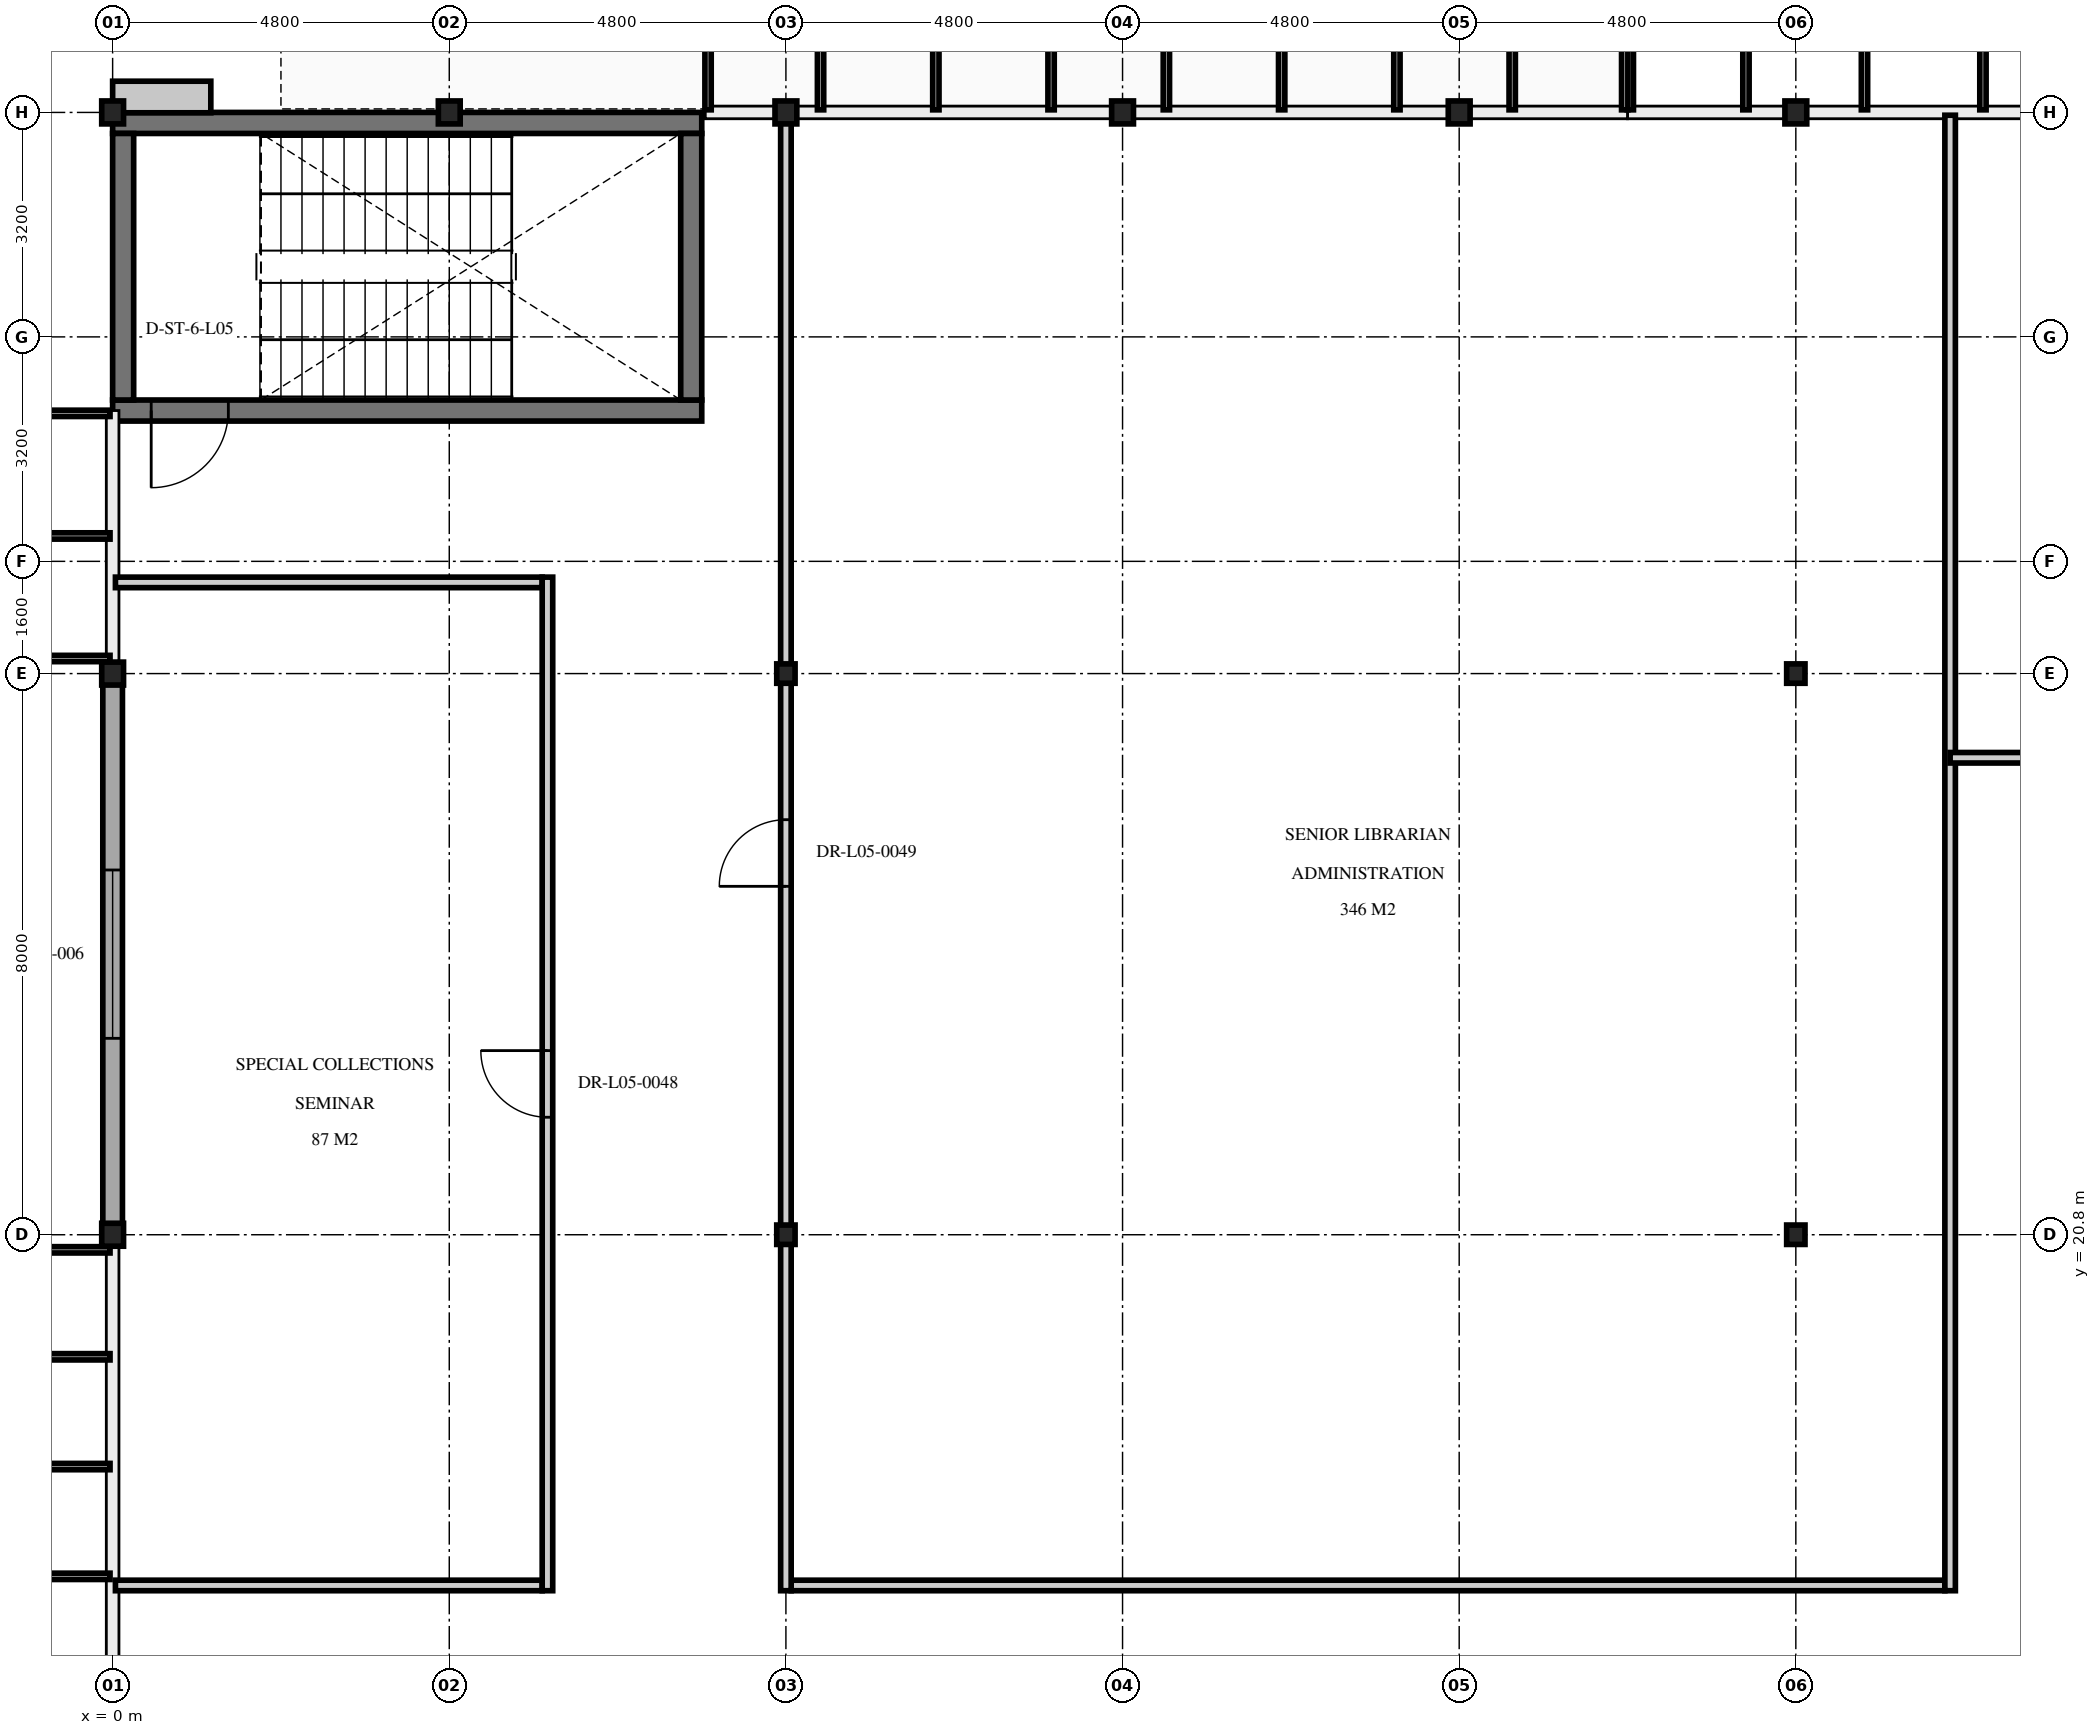
"""IFC4 building model, lengths in metres.
Left out: names, types, materials, properties, quantities, classifications, styles, units other than length and angle.
Written with IfcOpenShell. Run it as: python <this file> out.ifc"""

import sys

from ifc_helpers import new_model, si_unit, direction, frame, frame_2d, origin, origin_2d, place, context, subcontext, project, spatial, rectangle, i_section, extrude, element, fill, save


model = new_model("IFC4")
c1 = context("Model", 3, precision=1e-05, world=origin(), true_north=direction((0.0, 1.0)))
c2 = subcontext(c1, "Body", "Model", "MODEL_VIEW")
j1 = project(units=[si_unit("LENGTHUNIT", "METRE"), si_unit("PLANEANGLEUNIT", "RADIAN")], contexts=[c1])
p1 = place(None, origin())
s1 = spatial("IfcSite", under=j1, at=p1, CompositionType="ELEMENT")
p2 = place(p1, origin())
s2 = spatial("IfcBuilding", under=s1, at=p2, CompositionType="ELEMENT")
p3 = place(p2, frame((0.0, 0.0, 23.1)))
s3 = spatial("IfcBuildingStorey", under=s2, at=p3, CompositionType="ELEMENT", Elevation=23.1)
for number, where, z_axis, x_axis in (
    (1, (0.0, 36.8, 0.0), (0.0, 0.0, 1.0), (1.0, 0.0, 0.0)),
    (2, (4.8, 36.8, 0.0), (0.0, 0.0, 1.0), (1.0, 0.0, 0.0)),
    (3, (9.6, 36.8, 0.0), (0.0, 0.0, 1.0), (1.0, 0.0, 0.0)),
    (4, (14.4, 36.8, 0.0), (0.0, 0.0, 1.0), (1.0, 0.0, 0.0)),
    (5, (19.2, 36.8, 0.0), (0.0, 0.0, 1.0), (1.0, 0.0, 0.0)),
    (6, (24.0, 36.8, 0.0), (0.0, 0.0, 1.0), (1.0, 0.0, 0.0)),
    (7, (0.0, 20.8, 0.0), (0.0, 0.0, 1.0), (1.0, 0.0, 0.0)),
    (8, (0.0, 28.8, 0.0), (0.0, 0.0, 1.0), (1.0, 0.0, 0.0)),
):
    element("IfcColumn", number, at=place(p3, frame(where, z_axis=z_axis, x_axis=x_axis)), inside=s3, PredefinedType="COLUMN", context=c2, shape_type="SweptSolid", body=[
        extrude(i_section(OverallWidth=0.311, OverallDepth=0.327, WebThickness=0.016, FlangeThickness=0.025, at=origin_2d()), origin(), (0.0, 0.0, 1.0), 4.5),
    ])
for number, where, z_axis, x_axis in (
    (9, (9.6, 20.8, 0.0), (0.0, 0.0, 1.0), (1.0, 0.0, 0.0)),
    (10, (9.6, 28.8, 0.0), (0.0, 0.0, 1.0), (1.0, 0.0, 0.0)),
    (11, (24.0, 20.8, 0.0), (0.0, 0.0, 1.0), (1.0, 0.0, 0.0)),
    (12, (24.0, 28.8, 0.0), (0.0, 0.0, 1.0), (1.0, 0.0, 0.0)),
):
    element("IfcColumn", number, at=place(p3, frame(where, z_axis=z_axis, x_axis=x_axis)), inside=s3, PredefinedType="COLUMN", context=c2, shape_type="SweptSolid", body=[
        extrude(i_section(OverallWidth=0.261, OverallDepth=0.276, WebThickness=0.015, FlangeThickness=0.025, at=origin_2d()), origin(), (0.0, 0.0, 1.0), 4.31),
    ])
p4 = place(p3, frame((8.4, 32.55, 0.0), z_axis=(0.0, 0.0, 1.0), x_axis=(-1.0, 0.0, 0.0)))
e13 = element("IfcWall", 13, at=p4, inside=s3, PredefinedType="SHEAR", context=c2, shape_type="SweptSolid", body=[
    extrude(rectangle(XDim=8.4, YDim=0.3, at=frame_2d((4.2, 0.0))), origin(), (0.0, 0.0, 1.0), 4.29),
])
p5 = place(p4, frame((6.75, 0.0, 0.0)))
e14 = element("IfcOpeningElement", 14, at=p5, cuts=e13, PredefinedType="OPENING", context=c2, shape_type="SweptSolid", body=[
    extrude(rectangle(XDim=1.1, YDim=2.2, at=frame_2d((0.55, 1.1))), frame((0.0, 0.16, 0.0), z_axis=(0.0, -1.0, 0.0), x_axis=(1.0, 0.0, 0.0)), (0.0, 0.0, 1.0), 0.32),
])
p6 = place(p3, frame((0.0, 36.65, 0.0), z_axis=(0.0, 0.0, 1.0), x_axis=(1.0, 0.0, 0.0)))
e15 = element("IfcWall", 15, at=p6, inside=s3, PredefinedType="SHEAR", context=c2, shape_type="SweptSolid", body=[
    extrude(rectangle(XDim=8.4, YDim=0.3, at=frame_2d((4.2, 0.0))), origin(), (0.0, 0.0, 1.0), 4.29),
])
for number, where, z_axis, x_axis in (
    (16, (0.15, 32.7, 0.0), (0.0, 0.0, 1.0), (0.0, 1.0, 0.0)),
    (17, (8.25, 36.5, 0.0), (0.0, 0.0, 1.0), (0.0, -1.0, 0.0)),
):
    element("IfcWall", number, at=place(p3, frame(where, z_axis=z_axis, x_axis=x_axis)), inside=s3, PredefinedType="SHEAR", context=c2, shape_type="SweptSolid", body=[
        extrude(rectangle(XDim=3.8, YDim=0.3, at=frame_2d((1.9, 0.0))), origin(), (0.0, 0.0, 1.0), 4.29),
    ])
p7 = place(p3, frame((0.0, 20.715, 0.0), z_axis=(0.0, 0.0, 1.0), x_axis=(0.0, 1.0, 0.0)))
e18 = element("IfcWall", 18, at=p7, inside=s3, PredefinedType="SOLIDWALL", context=c2, shape_type="SweptSolid", body=[
    extrude(rectangle(XDim=8.17, YDim=0.28, at=frame_2d((4.085, 0.0))), origin(), (0.0, 0.0, 1.0), 3.653),
])
p8 = place(p7, frame((2.885, 0.0, 0.95)))
e19 = element("IfcOpeningElement", 19, at=p8, cuts=e18, PredefinedType="OPENING", context=c2, shape_type="SweptSolid", body=[
    extrude(rectangle(XDim=2.4, YDim=2.1, at=frame_2d((1.2, 1.05))), frame((0.0, 0.15, 0.0), z_axis=(0.0, -1.0, 0.0), x_axis=(1.0, 0.0, 0.0)), (0.0, 0.0, 1.0), 0.3),
])
for number, where, z_axis, x_axis in (
    (20, (0.04, 15.8, 0.0), (0.0, 0.0, 1.0), (1.0, 0.0, 0.0)),
    (21, (0.04, 30.1, 0.0), (0.0, 0.0, 1.0), (1.0, 0.0, 0.0)),
):
    element("IfcWall", number, at=place(p3, frame(where, z_axis=z_axis, x_axis=x_axis)), inside=s3, PredefinedType="PARTITIONING", context=c2, shape_type="SweptSolid", body=[
        extrude(rectangle(XDim=6.085, YDim=0.15, at=frame_2d((3.042, 0.0))), origin(), (0.0, 0.0, 1.0), 3.662),
    ])
p9 = place(p3, frame((6.2, 15.725, 0.0), z_axis=(0.0, 0.0, 1.0), x_axis=(0.0, 1.0, 0.0)))
e22 = element("IfcWall", 22, at=p9, inside=s3, PredefinedType="PARTITIONING", context=c2, shape_type="SweptSolid", body=[
    extrude(rectangle(XDim=14.45, YDim=0.15, at=frame_2d((7.225, 0.0))), origin(), (0.0, 0.0, 1.0), 3.653),
])
p10 = place(p9, frame((6.75, 0.0, 0.0)))
e23 = element("IfcOpeningElement", 23, at=p10, cuts=e22, PredefinedType="OPENING", context=c2, shape_type="SweptSolid", body=[
    extrude(rectangle(XDim=0.95, YDim=2.15, at=frame_2d((0.475, 1.075))), frame((0.0, 0.085, 0.0), z_axis=(0.0, -1.0, 0.0), x_axis=(1.0, 0.0, 0.0)), (0.0, 0.0, 1.0), 0.17),
])
p11 = place(p3, frame((9.675, 15.8, 0.0), z_axis=(0.0, 0.0, 1.0), x_axis=(1.0, 0.0, 0.0)))
e24 = element("IfcWall", 24, at=p11, inside=s3, PredefinedType="PARTITIONING", context=c2, shape_type="SweptSolid", body=[
    extrude(rectangle(XDim=16.45, YDim=0.15, at=frame_2d((8.225, 0.0))), origin(), (0.0, 0.0, 1.0), 3.662),
])
p12 = place(p3, frame((9.6, 15.725, 0.0), z_axis=(0.0, 0.0, 1.0), x_axis=(0.0, 1.0, 0.0)))
e25 = element("IfcWall", 25, at=p12, inside=s3, PredefinedType="PARTITIONING", context=c2, shape_type="SweptSolid", body=[
    extrude(rectangle(XDim=21.035, YDim=0.15, at=frame_2d((10.518, 0.0))), origin(), (0.0, 0.0, 1.0), 3.653),
])
p13 = place(p12, frame((10.042, 0.0, 0.0)))
e26 = element("IfcOpeningElement", 26, at=p13, cuts=e25, PredefinedType="OPENING", context=c2, shape_type="SweptSolid", body=[
    extrude(rectangle(XDim=0.95, YDim=2.15, at=frame_2d((0.475, 1.075))), frame((0.0, 0.085, 0.0), z_axis=(0.0, -1.0, 0.0), x_axis=(1.0, 0.0, 0.0)), (0.0, 0.0, 1.0), 0.17),
])
p14 = place(p3, frame((26.2, 15.725, 0.0), z_axis=(0.0, 0.0, 1.0), x_axis=(0.0, 1.0, 0.0)))
e27 = element("IfcWall", 27, at=p14, inside=s3, PredefinedType="PARTITIONING", context=c2, shape_type="SweptSolid", body=[
    extrude(rectangle(XDim=21.035, YDim=0.15, at=frame_2d((10.518, 0.0))), origin(), (0.0, 0.0, 1.0), 3.653),
])
p15 = place(p3, frame((26.2, 27.6, 0.0), z_axis=(0.0, 0.0, 1.0), x_axis=(1.0, 0.0, 0.0)))
e28 = element("IfcWall", 28, at=p15, inside=s3, PredefinedType="PARTITIONING", context=c2, shape_type="SweptSolid", body=[
    extrude(rectangle(XDim=7.36, YDim=0.15, at=frame_2d((3.68, 0.0))), origin(), (0.0, 0.0, 1.0), 3.662),
])
p16 = place(p15, frame((1.41, 0.0, 0.0)))
e29 = element("IfcOpeningElement", 29, at=p16, cuts=e28, PredefinedType="OPENING", context=c2, shape_type="SweptSolid", body=[
    extrude(rectangle(XDim=0.95, YDim=2.15, at=frame_2d((0.475, 1.075))), frame((0.0, 0.085, 0.0), z_axis=(0.0, -1.0, 0.0), x_axis=(1.0, 0.0, 0.0)), (0.0, 0.0, 1.0), 0.17),
])
p17 = place(p5, origin())
e30 = element("IfcDoor", 30, at=p17, inside=s3, OperationType="SINGLE_SWING_RIGHT", PredefinedType="DOOR", context=c2, shape_type="SweptSolid", body=[
    extrude(rectangle(XDim=1.1, YDim=2.2, at=frame_2d((0.55, 1.1))), frame((0.0, 0.025, 0.0), z_axis=(0.0, -1.0, 0.0), x_axis=(1.0, 0.0, 0.0)), (0.0, 0.0, 1.0), 0.05),
])
fill(e14, e30)
p18 = place(p8, origin())
e31 = element("IfcWindow", 31, at=p18, inside=s3, PartitioningType="SINGLE_PANEL", PredefinedType="WINDOW", context=c2, shape_type="SweptSolid", body=[
    extrude(rectangle(XDim=2.4, YDim=2.1, at=frame_2d((1.2, 1.05))), frame((0.0, 0.03, 0.0), z_axis=(0.0, -1.0, 0.0), x_axis=(1.0, 0.0, 0.0)), (0.0, 0.0, 1.0), 0.06),
])
fill(e19, e31)
p19 = place(p10, origin())
e32 = element("IfcDoor", 32, at=p19, inside=s3, OperationType="SINGLE_SWING_RIGHT", PredefinedType="DOOR", context=c2, shape_type="SweptSolid", body=[
    extrude(rectangle(XDim=0.95, YDim=2.15, at=frame_2d((0.475, 1.075))), frame((0.0, 0.025, 0.0), z_axis=(0.0, -1.0, 0.0), x_axis=(1.0, 0.0, 0.0)), (0.0, 0.0, 1.0), 0.05),
])
fill(e23, e32)
p20 = place(p13, origin())
e33 = element("IfcDoor", 33, at=p20, inside=s3, OperationType="SINGLE_SWING_LEFT", PredefinedType="DOOR", context=c2, shape_type="SweptSolid", body=[
    extrude(rectangle(XDim=0.95, YDim=2.15, at=frame_2d((0.475, 1.075))), frame((0.0, 0.025, 0.0), z_axis=(0.0, -1.0, 0.0), x_axis=(1.0, 0.0, 0.0)), (0.0, 0.0, 1.0), 0.05),
])
fill(e26, e33)
save(model, sys.argv[1])
